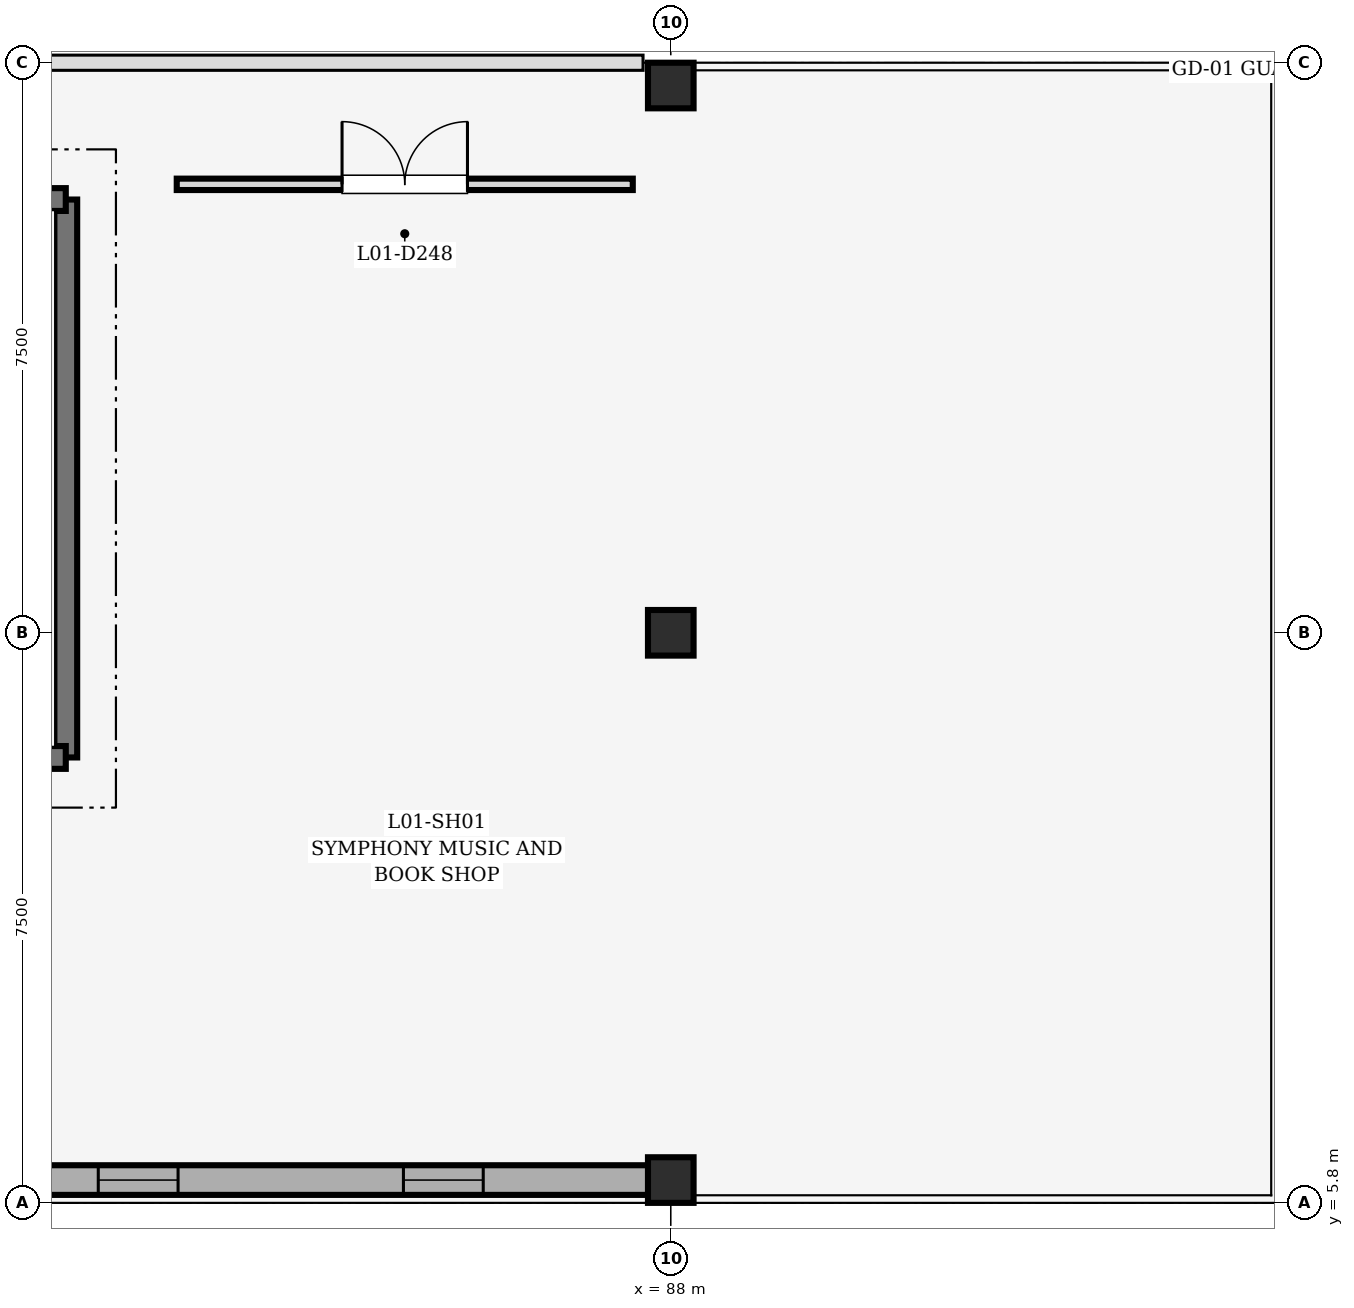
"""IFC4 building model, lengths in metres.
Left out: names, types, materials, properties, quantities, classifications, styles, units other than length and angle.
Written with IfcOpenShell. Run it as: python <this file> out.ifc"""

import sys

from ifc_helpers import new_model, si_unit, direction, frame, frame_2d, origin, origin_2d, place, context, subcontext, project, spatial, rectangle, extrude, element, fill, save


model = new_model("IFC4")
c1 = context("Model", 3, precision=1e-05, world=origin(), true_north=direction((0.0, 1.0)))
c2 = subcontext(c1, "Body", "Model", "MODEL_VIEW")
j1 = project(units=[si_unit("LENGTHUNIT", "METRE"), si_unit("PLANEANGLEUNIT", "RADIAN")], contexts=[c1])
p1 = place(None, origin())
s1 = spatial("IfcSite", under=j1, at=p1, CompositionType="ELEMENT")
p2 = place(p1, origin())
s2 = spatial("IfcBuilding", under=s1, at=p2, CompositionType="ELEMENT")
p3 = place(p2, origin())
s3 = spatial("IfcBuildingStorey", under=s2, at=p3, CompositionType="ELEMENT", Elevation=0.0)
for number, where, z_axis, x_axis in (
    (1, (88.0, 6.1, 0.0), (0.0, 0.0, 1.0), (1.0, 0.0, 0.0)),
    (2, (88.0, 13.3, 0.0), (0.0, 0.0, 1.0), (1.0, 0.0, 0.0)),
    (3, (88.0, 20.5, 0.0), (0.0, 0.0, 1.0), (1.0, 0.0, 0.0)),
):
    element("IfcColumn", number, at=place(p3, frame(where, z_axis=z_axis, x_axis=x_axis)), inside=s3, PredefinedType="COLUMN", context=c2, shape_type="SweptSolid", body=[
        extrude(rectangle(XDim=0.6, YDim=0.6, at=origin_2d()), origin(), (0.0, 0.0, 1.0), 5.4),
    ])
p4 = place(p3, frame((87.715, 6.1, 0.0), z_axis=(0.0, 0.0, 1.0), x_axis=(-1.0, 0.0, 0.0)))
e4 = element("IfcWall", 4, at=p4, inside=s3, PredefinedType="STANDARD", context=c2, shape_type="SweptSolid", body=[
    extrude(rectangle(XDim=9.43, YDim=0.39, at=frame_2d((4.715, 0.0))), origin(), (0.0, 0.0, 1.0), 4.427),
])
p5 = place(p4, frame((2.183, 0.0, 0.85)))
e5 = element("IfcOpeningElement", 5, at=p5, cuts=e4, PredefinedType="OPENING", context=c2, shape_type="SweptSolid", body=[
    extrude(rectangle(XDim=1.05, YDim=1.95, at=frame_2d((0.525, 0.975))), frame((0.0, 0.207, 0.0), z_axis=(0.0, -1.0, 0.0), x_axis=(1.0, 0.0, 0.0)), (0.0, 0.0, 1.0), 0.414),
])
p6 = place(p4, frame((6.198, 0.0, 0.85)))
e6 = element("IfcOpeningElement", 6, at=p6, cuts=e4, PredefinedType="OPENING", context=c2, shape_type="SweptSolid", body=[
    extrude(rectangle(XDim=1.05, YDim=1.95, at=frame_2d((0.525, 0.975))), frame((0.0, 0.207, 0.0), z_axis=(0.0, -1.0, 0.0), x_axis=(1.0, 0.0, 0.0)), (0.0, 0.0, 1.0), 0.414),
])
p7 = place(p3, frame((80.04, 19.0, 0.0), z_axis=(0.0, 0.0, 1.0), x_axis=(0.0, -1.0, 0.0)))
e7 = element("IfcWall", 7, at=p7, inside=s3, PredefinedType="SHEAR", context=c2, shape_type="SweptSolid", body=[
    extrude(rectangle(XDim=7.34, YDim=0.3, at=frame_2d((3.67, 0.0))), origin(), (0.0, 0.0, 1.0), 5.14),
])
for number, where, z_axis, x_axis in (
    (8, (80.04, 11.66, 0.0), (0.0, 0.0, 1.0), (-1.0, 0.0, 0.0)),
    (9, (68.36, 19.0, 0.0), (0.0, 0.0, 1.0), (1.0, 0.0, 0.0)),
):
    element("IfcWall", number, at=place(p3, frame(where, z_axis=z_axis, x_axis=x_axis)), inside=s3, PredefinedType="SHEAR", context=c2, shape_type="SweptSolid", body=[
        extrude(rectangle(XDim=11.68, YDim=0.3, at=frame_2d((5.84, 0.0))), origin(), (0.0, 0.0, 1.0), 5.14),
    ])
p8 = place(p3, frame((81.5, 19.2, 0.0), z_axis=(0.0, 0.0, 1.0), x_axis=(1.0, 0.0, 0.0)))
e10 = element("IfcWall", 10, at=p8, inside=s3, PredefinedType="PARTITIONING", context=c2, shape_type="SweptSolid", body=[
    extrude(rectangle(XDim=6.0, YDim=0.15, at=frame_2d((3.0, 0.0))), origin(), (0.0, 0.0, 1.0), 5.125),
])
p9 = place(p8, frame((2.175, 0.0, 0.0)))
e11 = element("IfcOpeningElement", 11, at=p9, cuts=e10, PredefinedType="OPENING", context=c2, shape_type="SweptSolid", body=[
    extrude(rectangle(XDim=1.65, YDim=2.22, at=frame_2d((0.825, 1.11))), frame((0.0, 0.087, 0.0), z_axis=(0.0, -1.0, 0.0), x_axis=(1.0, 0.0, 0.0)), (0.0, 0.0, 1.0), 0.174),
])
p10 = place(p5, origin())
e12 = element("IfcWindow", 12, at=p10, inside=s3, PartitioningType="DOUBLE_PANEL_VERTICAL", PredefinedType="WINDOW", context=c2, shape_type="SweptSolid", body=[
    extrude(rectangle(XDim=1.05, YDim=1.95, at=frame_2d((0.525, 0.975))), frame((0.0, 0.03, 0.0), z_axis=(0.0, -1.0, 0.0), x_axis=(1.0, 0.0, 0.0)), (0.0, 0.0, 1.0), 0.06),
])
fill(e5, e12)
p11 = place(p6, origin())
e13 = element("IfcWindow", 13, at=p11, inside=s3, PartitioningType="DOUBLE_PANEL_VERTICAL", PredefinedType="WINDOW", context=c2, shape_type="SweptSolid", body=[
    extrude(rectangle(XDim=1.05, YDim=1.95, at=frame_2d((0.525, 0.975))), frame((0.0, 0.03, 0.0), z_axis=(0.0, -1.0, 0.0), x_axis=(1.0, 0.0, 0.0)), (0.0, 0.0, 1.0), 0.06),
])
fill(e6, e13)
p12 = place(p9, origin())
e14 = element("IfcDoor", 14, at=p12, inside=s3, OperationType="DOUBLE_DOOR_SINGLE_SWING", PredefinedType="DOOR", context=c2, shape_type="SweptSolid", body=[
    extrude(rectangle(XDim=1.65, YDim=2.22, at=frame_2d((0.825, 1.11))), frame((0.0, 0.025, 0.0), z_axis=(0.0, -1.0, 0.0), x_axis=(1.0, 0.0, 0.0)), (0.0, 0.0, 1.0), 0.05),
])
fill(e11, e14)
save(model, sys.argv[1])
